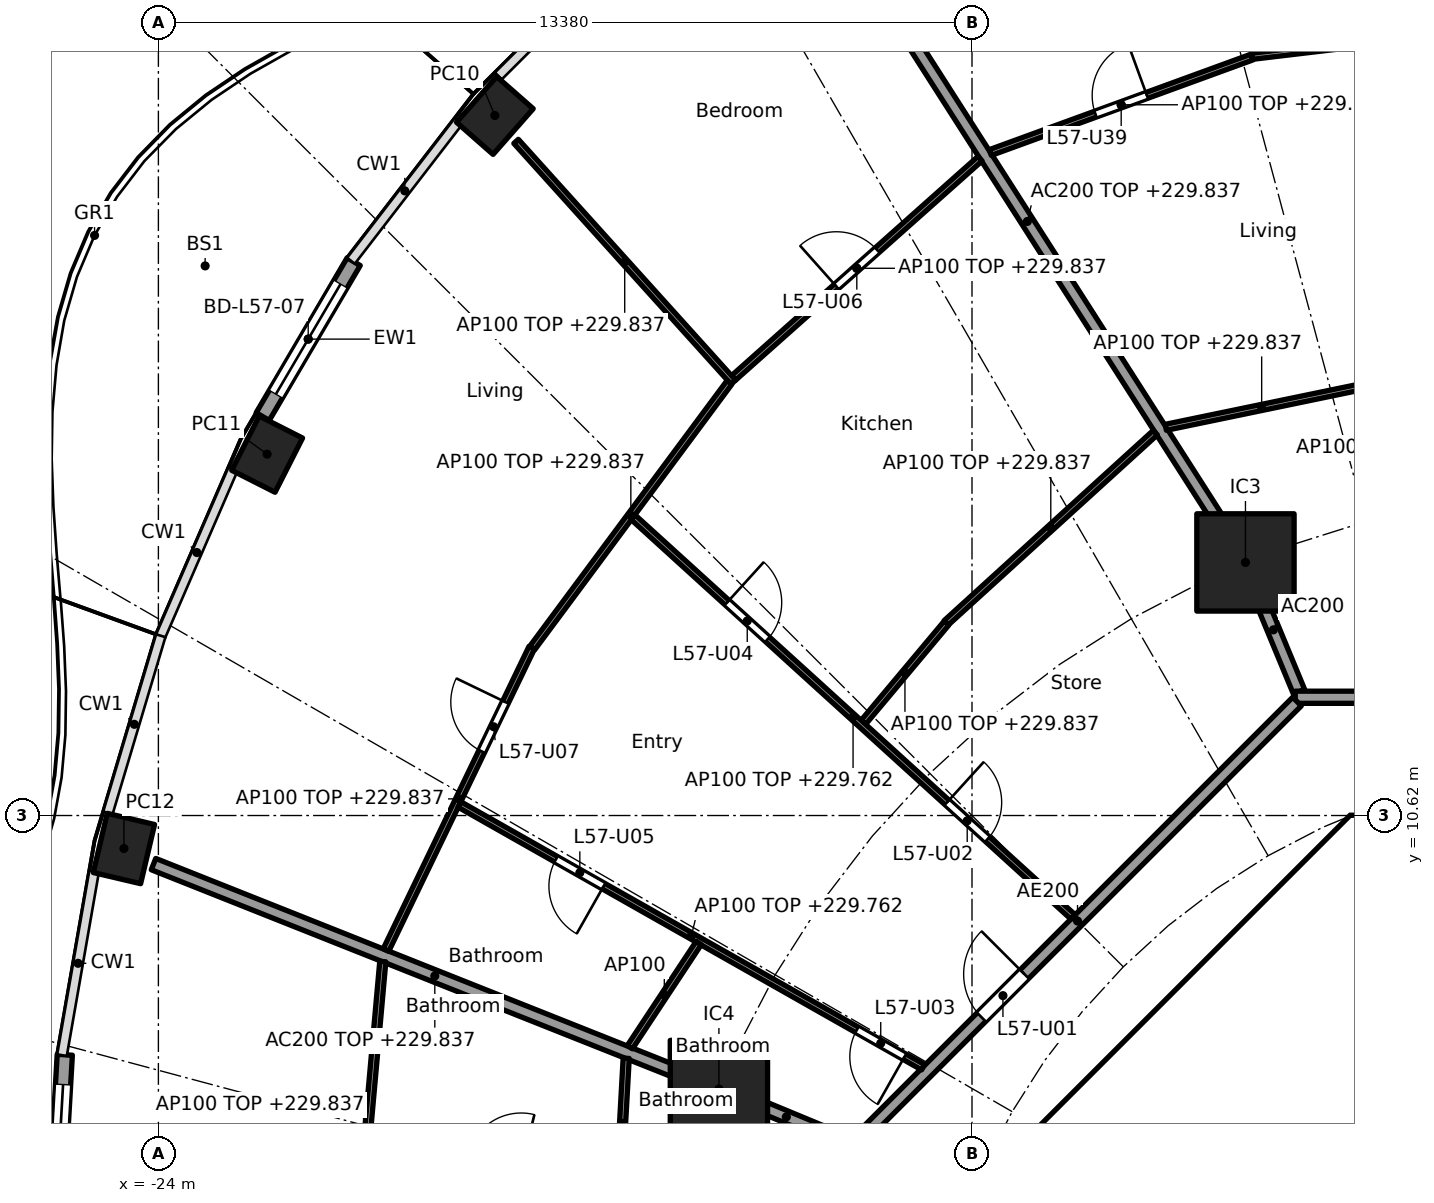
"""IFC4 building model, lengths in metres.
Left out: names, types, materials, properties, quantities, classifications, styles, units other than length and angle.
Written with IfcOpenShell. Run it as: python <this file> out.ifc"""

import sys

from ifc_helpers import new_model, si_unit, direction, frame, frame_2d, origin, origin_2d, place, context, subcontext, project, spatial, polyline, rectangle, hollow_rectangle, outline, extrude, element, fill, save


model = new_model("IFC4")
c1 = context("Model", 3, precision=1e-05, world=origin(), true_north=direction((0.0, 1.0)))
c2 = subcontext(c1, "Body", "Model", "MODEL_VIEW")
j1 = project(units=[si_unit("LENGTHUNIT", "METRE"), si_unit("PLANEANGLEUNIT", "RADIAN")], contexts=[c1])
p1 = place(None, origin())
s1 = spatial("IfcSite", under=j1, at=p1, CompositionType="ELEMENT")
p2 = place(p1, origin())
s2 = spatial("IfcBuilding", under=s1, at=p2, CompositionType="ELEMENT")
p3 = place(p2, frame((0.0, 0.0, 227.0)))
s3 = spatial("IfcBuildingStorey", under=s2, at=p3, CompositionType="ELEMENT", Elevation=227.0)
for number, where, z_axis, x_axis in (
    (1, (-18.467, 22.132, 0.0), (0.0, 0.0, 1.0), (-0.66, -0.751, 0.0)),
    (2, (-22.212, 16.563, 0.0), (0.0, 0.0, 1.0), (-0.452, -0.892, 0.0)),
    (3, (-24.567, 10.077, 0.0), (0.0, 0.0, 1.0), (-0.229, -0.973, 0.0)),
):
    element("IfcColumn", number, at=place(p3, frame(where, z_axis=z_axis, x_axis=x_axis)), inside=s3, PredefinedType="COLUMN", context=c2, shape_type="SweptSolid", body=[
        extrude(hollow_rectangle(XDim=1.0, YDim=0.8, WallThickness=0.032, at=origin_2d()), origin(), (0.0, 0.0, 1.0), 3.7),
    ])
for number, where, z_axis, x_axis in (
    (4, (-6.123, 14.782, 0.0), (0.0, 0.0, 1.0), (1.0, 0.0, 0.0)),
    (5, (-14.782, 6.123, 0.0), (0.0, 0.0, 1.0), (1.0, 0.0, 0.0)),
):
    element("IfcColumn", number, at=place(p3, frame(where, z_axis=z_axis, x_axis=x_axis)), inside=s3, PredefinedType="COLUMN", context=c2, shape_type="SweptSolid", body=[
        extrude(rectangle(XDim=1.6, YDim=1.6, at=origin_2d()), origin(), (0.0, 0.0, 1.0), 3.7),
    ])
p4 = place(p3, frame((-22.284, 17.181, 0.0), z_axis=(0.0, 0.0, 1.0), x_axis=(0.506330171469, 0.862339699573, 0.0)))
e6 = element("IfcWall", 6, at=p4, inside=s3, PredefinedType="SOLIDWALL", context=c2, shape_type="SweptSolid", body=[
    extrude(rectangle(XDim=2.954, YDim=0.25, at=frame_2d((1.477, 0.0))), origin(), (0.0, 0.0, 1.0), 3.44),
])
p5 = place(p4, frame((0.427, 0.0, 0.0)))
e7 = element("IfcOpeningElement", 7, at=p5, cuts=e6, PredefinedType="OPENING", context=c2, shape_type="SweptSolid", body=[
    extrude(rectangle(XDim=2.1, YDim=2.4, at=frame_2d((1.05, 1.2))), frame((0.0, 0.135, 0.0), z_axis=(0.0, -1.0, 0.0), x_axis=(1.0, 0.0, 0.0)), (0.0, 0.0, 1.0), 0.27),
])
p6 = place(p3, frame((-25.717, 3.61, 0.0), z_axis=(0.0, 0.0, 1.0), x_axis=(0.057528189427, 0.998343882348, 0.0)))
e8 = element("IfcWall", 8, at=p6, inside=s3, PredefinedType="SOLIDWALL", context=c2, shape_type="SweptSolid", body=[
    extrude(rectangle(XDim=3.081, YDim=0.25, at=frame_2d((1.541, 0.0))), origin(), (0.0, 0.0, 1.0), 3.44),
])
p7 = place(p6, frame((0.49, 0.0, 0.0)))
e9 = element("IfcOpeningElement", 9, at=p7, cuts=e8, PredefinedType="OPENING", context=c2, shape_type="SweptSolid", body=[
    extrude(rectangle(XDim=2.1, YDim=2.4, at=frame_2d((1.05, 1.2))), frame((0.0, 0.135, 0.0), z_axis=(0.0, -1.0, 0.0), x_axis=(1.0, 0.0, 0.0)), (0.0, 0.0, 1.0), 0.27),
])
p8 = place(p3, frame((-4.613, 9.988, 0.0), z_axis=(0.0, 0.0, 1.0), x_axis=(-0.707106781187, -0.707106781187, 0.0)))
e10 = element("IfcWall", 10, at=p8, inside=s3, PredefinedType="SHEAR", context=c2, shape_type="SweptSolid", body=[
    extrude(rectangle(XDim=7.602, YDim=0.6, at=frame_2d((3.801, 0.0))), origin(), (0.0, 0.0, 1.0), 3.44),
])
p9 = place(p8, frame((0.351, 0.0, 0.0)))
e11 = element("IfcOpeningElement", 11, at=p9, cuts=e10, PredefinedType="OPENING", context=c2, shape_type="SweptSolid", body=[
    extrude(rectangle(XDim=1.1, YDim=2.1, at=frame_2d((0.55, 1.05))), frame((0.0, 0.31, 0.0), z_axis=(0.0, -1.0, 0.0), x_axis=(1.0, 0.0, 0.0)), (0.0, 0.0, 1.0), 0.62),
])
p10 = place(p3, frame((-6.2, 4.3, 0.0), z_axis=(0.0, 0.0, 1.0), x_axis=(0.0, 1.0, 0.0)))
e12 = element("IfcWall", 12, at=p10, inside=s3, PredefinedType="PARTITIONING", context=c2, shape_type="SweptSolid", body=[
    extrude(rectangle(XDim=3.527, YDim=0.15, at=frame_2d((1.763, 0.0))), origin(), (0.0, 0.0, 1.0), 3.44),
])
p11 = place(p10, frame((0.262, 0.0, 0.0)))
e13 = element("IfcOpeningElement", 13, at=p11, cuts=e12, PredefinedType="OPENING", context=c2, shape_type="SweptSolid", body=[
    extrude(rectangle(XDim=0.9, YDim=2.1, at=frame_2d((0.45, 1.05))), frame((0.0, 0.085, 0.0), z_axis=(0.0, -1.0, 0.0), x_axis=(1.0, 0.0, 0.0)), (0.0, 0.0, 1.0), 0.17),
])
p12 = place(p10, frame((2.138, 0.0, 0.0)))
e14 = element("IfcOpeningElement", 14, at=p12, cuts=e12, PredefinedType="OPENING", context=c2, shape_type="SweptSolid", body=[
    extrude(rectangle(XDim=0.9, YDim=2.1, at=frame_2d((0.45, 1.05))), frame((0.0, 0.085, 0.0), z_axis=(0.0, -1.0, 0.0), x_axis=(1.0, 0.0, 0.0)), (0.0, 0.0, 1.0), 0.17),
])
p13 = place(p3, origin())
e15 = element("IfcWall", 15, at=p13, inside=s3, PredefinedType="SHEAR", context=c2, shape_type="SweptSolid", body=[
    extrude(outline(polyline([(-4.152, 10.025), (-4.401, 9.776), (-4.825, 10.2), (-4.401, 10.625), (4.401, 10.625), (4.825, 10.2), (4.401, 9.776), (4.152, 10.025), (-4.152, 10.025)])), origin(), (0.0, 0.0, 1.0), 3.44),
])
p14 = place(p3, frame((-8.301, 5.8, 0.0), z_axis=(0.0, 0.0, 1.0), x_axis=(1.0, 0.0, 0.0)))
e16 = element("IfcWall", 16, at=p14, inside=s3, PredefinedType="PARTITIONING", context=c2, shape_type="SweptSolid", body=[
    extrude(rectangle(XDim=2.026, YDim=0.15, at=frame_2d((1.013, 0.0))), origin(), (0.0, 0.0, 1.0), 3.44),
])
p15 = place(p3, frame((-5.243, 12.657, 0.0), z_axis=(0.0, 0.0, 1.0), x_axis=(-0.382691608661, 0.923876145736, 0.0)))
e17 = element("IfcWall", 17, at=p15, inside=s3, PredefinedType="PARTITIONING", context=c2, shape_type="SweptSolid", body=[
    extrude(rectangle(XDim=2.2, YDim=0.2, at=frame_2d((1.1, 0.0))), origin(), (0.0, 0.0, 1.0), 3.44),
])
p16 = place(p3, frame((-6.15, 14.824, 0.0), z_axis=(0.0, 0.0, 1.0), x_axis=(-0.538870687577, 0.842388498301, 0.0)))
e18 = element("IfcWall", 18, at=p16, inside=s3, PredefinedType="PARTITIONING", context=c2, shape_type="SweptSolid", body=[
    extrude(rectangle(XDim=13.213, YDim=0.2, at=frame_2d((6.606, 0.0))), origin(), (0.0, 0.0, 1.0), 2.837),
])
p17 = place(p3, frame((-12.657, 5.243, 0.0), z_axis=(0.0, 0.0, 1.0), x_axis=(-0.923859888513, 0.38273085373, 0.0)))
e19 = element("IfcWall", 19, at=p17, inside=s3, PredefinedType="PARTITIONING", context=c2, shape_type="SweptSolid", body=[
    extrude(rectangle(XDim=2.199, YDim=0.2, at=frame_2d((1.1, 0.0))), origin(), (0.0, 0.0, 1.0), 3.44),
])
p18 = place(p3, frame((-14.829, 6.141, 0.0), z_axis=(0.0, 0.0, 1.0), x_axis=(-0.929202069098, 0.36957206981, 0.0)))
e20 = element("IfcWall", 20, at=p18, inside=s3, PredefinedType="PARTITIONING", context=c2, shape_type="SweptSolid", body=[
    extrude(rectangle(XDim=9.957, YDim=0.2, at=frame_2d((4.978, 0.0))), origin(), (0.0, 0.0, 1.0), 2.837),
])
p19 = place(p3, frame((5.104, 12.565, 0.0), z_axis=(0.0, 0.0, 1.0), x_axis=(-1.0, 0.0, 0.0)))
e21 = element("IfcWall", 21, at=p19, inside=s3, PredefinedType="PARTITIONING", context=c2, shape_type="SweptSolid", body=[
    extrude(rectangle(XDim=10.409, YDim=0.2, at=frame_2d((5.205, 0.0))), origin(), (0.0, 0.0, 1.0), 3.44),
])
p20 = place(p19, frame((3.303, 0.0, 0.0)))
e22 = element("IfcOpeningElement", 22, at=p20, cuts=e21, PredefinedType="OPENING", context=c2, shape_type="SweptSolid", body=[
    extrude(rectangle(XDim=1.0, YDim=2.1, at=frame_2d((0.5, 1.05))), frame((0.0, 0.11, 0.0), z_axis=(0.0, -1.0, 0.0), x_axis=(1.0, 0.0, 0.0)), (0.0, 0.0, 1.0), 0.22),
])
p21 = place(p3, frame((-5.275, 12.494, 0.0), z_axis=(0.0, 0.0, 1.0), x_axis=(-0.707106781187, -0.707106781187, 0.0)))
e23 = element("IfcWall", 23, at=p21, inside=s3, PredefinedType="PARTITIONING", context=c2, shape_type="SweptSolid", body=[
    extrude(rectangle(XDim=10.209, YDim=0.2, at=frame_2d((5.104, 0.0))), origin(), (0.0, 0.0, 1.0), 3.44),
])
p22 = place(p21, frame((6.339, 0.0, 0.0)))
e24 = element("IfcOpeningElement", 24, at=p22, cuts=e23, PredefinedType="OPENING", context=c2, shape_type="SweptSolid", body=[
    extrude(rectangle(XDim=1.0, YDim=2.1, at=frame_2d((0.5, 1.05))), frame((0.0, 0.11, 0.0), z_axis=(0.0, -1.0, 0.0), x_axis=(1.0, 0.0, 0.0)), (0.0, 0.0, 1.0), 0.22),
])
p23 = place(p3, frame((-1.166, 23.683, 0.0), z_axis=(0.0, 0.0, 1.0), x_axis=(-0.992961712415, -0.118435795593, 0.0)))
e25 = element("IfcWall", 25, at=p23, inside=s3, PredefinedType="PARTITIONING", context=c2, shape_type="SweptSolid", body=[
    extrude(rectangle(XDim=4.885, YDim=0.1, at=frame_2d((2.443, 0.0))), origin(), (0.0, 0.0, 1.0), 2.837),
])
p24 = place(p3, frame((-4.28, 17.657, 0.0), z_axis=(0.0, 0.0, 1.0), x_axis=(-0.979195545385, -0.202918909661, 0.0)))
e26 = element("IfcWall", 26, at=p24, inside=s3, PredefinedType="PARTITIONING", context=c2, shape_type="SweptSolid", body=[
    extrude(rectangle(XDim=3.221, YDim=0.1, at=frame_2d((1.61, 0.0))), origin(), (0.0, 0.0, 1.0), 2.837),
])
p25 = place(p3, frame((-6.014, 23.094, 0.0), z_axis=(0.0, 0.0, 1.0), x_axis=(-0.939433575811, -0.342731026665, 0.0)))
e27 = element("IfcWall", 27, at=p25, inside=s3, PredefinedType="PARTITIONING", context=c2, shape_type="SweptSolid", body=[
    extrude(rectangle(XDim=4.583, YDim=0.1, at=frame_2d((2.291, 0.0))), origin(), (0.0, 0.0, 1.0), 2.837),
])
p26 = place(p25, frame((1.841, 0.0, 0.0)))
e28 = element("IfcOpeningElement", 28, at=p26, cuts=e27, PredefinedType="OPENING", context=c2, shape_type="SweptSolid", body=[
    extrude(rectangle(XDim=0.9, YDim=2.1, at=frame_2d((0.45, 1.05))), frame((0.0, 0.06, 0.0), z_axis=(0.0, -1.0, 0.0), x_axis=(1.0, 0.0, 0.0)), (0.0, 0.0, 1.0), 0.12),
])
p27 = place(p3, frame((-7.605, 16.917, 0.0), z_axis=(0.0, 0.0, 1.0), x_axis=(-0.739828340504, -0.672795679673, 0.0)))
e29 = element("IfcWall", 29, at=p27, inside=s3, PredefinedType="PARTITIONING", context=c2, shape_type="SweptSolid", body=[
    extrude(rectangle(XDim=4.647, YDim=0.1, at=frame_2d((2.324, 0.0))), origin(), (0.0, 0.0, 1.0), 2.837),
])
p28 = place(p3, frame((-10.488, 21.422, 0.0), z_axis=(0.0, 0.0, 1.0), x_axis=(-0.747148551049, -0.664657086523, 0.0)))
e30 = element("IfcWall", 30, at=p28, inside=s3, PredefinedType="PARTITIONING", context=c2, shape_type="SweptSolid", body=[
    extrude(rectangle(XDim=5.425, YDim=0.1, at=frame_2d((2.712, 0.0))), origin(), (0.0, 0.0, 1.0), 2.837),
])
p29 = place(p28, frame((2.262, 0.0, 0.0)))
e31 = element("IfcOpeningElement", 31, at=p29, cuts=e30, PredefinedType="OPENING", context=c2, shape_type="SweptSolid", body=[
    extrude(rectangle(XDim=0.9, YDim=2.1, at=frame_2d((0.45, 1.05))), frame((0.0, 0.06, 0.0), z_axis=(0.0, -1.0, 0.0), x_axis=(1.0, 0.0, 0.0)), (0.0, 0.0, 1.0), 0.12),
])
p30 = place(p3, frame((-11.039, 13.785, 0.0), z_axis=(0.0, 0.0, 1.0), x_axis=(-0.642323585424, -0.766433566337, 0.0)))
e32 = element("IfcWall", 32, at=p30, inside=s3, PredefinedType="PARTITIONING", context=c2, shape_type="SweptSolid", body=[
    extrude(rectangle(XDim=2.13, YDim=0.1, at=frame_2d((1.065, 0.0))), origin(), (0.0, 0.0, 1.0), 2.837),
])
p31 = place(p3, frame((-14.545, 17.746, 0.0), z_axis=(0.0, 0.0, 1.0), x_axis=(-0.669829144173, 0.742515264232, 0.0)))
e33 = element("IfcWall", 33, at=p31, inside=s3, PredefinedType="PARTITIONING", context=c2, shape_type="SweptSolid", body=[
    extrude(rectangle(XDim=5.334, YDim=0.1, at=frame_2d((2.667, 0.0))), origin(), (0.0, 0.0, 1.0), 2.837),
])
p32 = place(p3, frame((-14.608, 17.743, 0.0), z_axis=(0.0, 0.0, 1.0), x_axis=(-0.596174489482, -0.8028548923, 0.0)))
e34 = element("IfcWall", 34, at=p32, inside=s3, PredefinedType="PARTITIONING", context=c2, shape_type="SweptSolid", body=[
    extrude(rectangle(XDim=5.442, YDim=0.1, at=frame_2d((2.721, 0.0))), origin(), (0.0, 0.0, 1.0), 2.837),
])
p33 = place(p3, frame((-8.959, 8.952, 0.0), z_axis=(0.0, 0.0, 1.0), x_axis=(-0.740140081805, 0.672452719011, 0.0)))
e35 = element("IfcWall", 35, at=p33, inside=s3, PredefinedType="PARTITIONING", context=c2, shape_type="SweptSolid", body=[
    extrude(rectangle(XDim=9.775, YDim=0.1, at=frame_2d((4.887, 0.0))), origin(), (0.0, 0.0, 1.0), 2.762),
])
p34 = place(p33, frame((1.901, 0.0, 0.0)))
e36 = element("IfcOpeningElement", 36, at=p34, cuts=e35, PredefinedType="OPENING", context=c2, shape_type="SweptSolid", body=[
    extrude(rectangle(XDim=0.9, YDim=2.1, at=frame_2d((0.45, 1.05))), frame((0.0, 0.06, 0.0), z_axis=(0.0, -1.0, 0.0), x_axis=(1.0, 0.0, 0.0)), (0.0, 0.0, 1.0), 0.12),
])
p35 = place(p33, frame((6.789, 0.0, 0.0)))
e37 = element("IfcOpeningElement", 37, at=p35, cuts=e35, PredefinedType="OPENING", context=c2, shape_type="SweptSolid", body=[
    extrude(rectangle(XDim=0.9, YDim=2.1, at=frame_2d((0.45, 1.05))), frame((0.0, 0.06, 0.0), z_axis=(0.0, -1.0, 0.0), x_axis=(1.0, 0.0, 0.0)), (0.0, 0.0, 1.0), 0.12),
])
p36 = place(p3, frame((-17.861, 13.379, 0.0), z_axis=(0.0, 0.0, 1.0), x_axis=(-0.434302390612, -0.900767136117, 0.0)))
e38 = element("IfcWall", 38, at=p36, inside=s3, PredefinedType="PARTITIONING", context=c2, shape_type="SweptSolid", body=[
    extrude(rectangle(XDim=5.519, YDim=0.1, at=frame_2d((2.759, 0.0))), origin(), (0.0, 0.0, 1.0), 2.837),
])
p37 = place(p36, frame((0.992, 0.0, 0.0)))
e39 = element("IfcOpeningElement", 39, at=p37, cuts=e38, PredefinedType="OPENING", context=c2, shape_type="SweptSolid", body=[
    extrude(rectangle(XDim=0.9, YDim=2.1, at=frame_2d((0.45, 1.05))), frame((0.0, 0.06, 0.0), z_axis=(0.0, -1.0, 0.0), x_axis=(1.0, 0.0, 0.0)), (0.0, 0.0, 1.0), 0.12),
])
p38 = place(p3, frame((-11.425, 6.48, 0.0), z_axis=(0.0, 0.0, 1.0), x_axis=(-0.869969596547, 0.493105365094, 0.0)))
e40 = element("IfcWall", 40, at=p38, inside=s3, PredefinedType="PARTITIONING", context=c2, shape_type="SweptSolid", body=[
    extrude(rectangle(XDim=8.762, YDim=0.1, at=frame_2d((4.381, 0.0))), origin(), (0.0, 0.0, 1.0), 2.762),
])
p39 = place(p38, frame((0.35, 0.0, 0.0)))
e41 = element("IfcOpeningElement", 41, at=p39, cuts=e40, PredefinedType="OPENING", context=c2, shape_type="SweptSolid", body=[
    extrude(rectangle(XDim=0.9, YDim=2.1, at=frame_2d((0.45, 1.05))), frame((0.0, 0.06, 0.0), z_axis=(0.0, -1.0, 0.0), x_axis=(1.0, 0.0, 0.0)), (0.0, 0.0, 1.0), 0.12),
])
p40 = place(p38, frame((6.038, 0.0, 0.0)))
e42 = element("IfcOpeningElement", 42, at=p40, cuts=e40, PredefinedType="OPENING", context=c2, shape_type="SweptSolid", body=[
    extrude(rectangle(XDim=0.9, YDim=2.1, at=frame_2d((0.45, 1.05))), frame((0.0, 0.06, 0.0), z_axis=(0.0, -1.0, 0.0), x_axis=(1.0, 0.0, 0.0)), (0.0, 0.0, 1.0), 0.12),
])
p41 = place(p3, frame((-15.114, 8.524, 0.0), z_axis=(0.0, 0.0, 1.0), x_axis=(-0.551211457161, -0.834365585037, 0.0)))
e43 = element("IfcWall", 43, at=p41, inside=s3, PredefinedType="PARTITIONING", context=c2, shape_type="SweptSolid", body=[
    extrude(rectangle(XDim=2.054, YDim=0.1, at=frame_2d((1.027, 0.0))), origin(), (0.0, 0.0, 1.0), 3.44),
])
p42 = place(p3, frame((-16.307, 6.627, 0.0), z_axis=(0.0, 0.0, 1.0), x_axis=(-0.055608865939, -0.998452629837, 0.0)))
e44 = element("IfcWall", 44, at=p42, inside=s3, PredefinedType="PARTITIONING", context=c2, shape_type="SweptSolid", body=[
    extrude(rectangle(XDim=2.143, YDim=0.1, at=frame_2d((1.071, 0.0))), origin(), (0.0, 0.0, 1.0), 2.837),
])
p43 = place(p3, frame((-20.31, 8.218, 0.0), z_axis=(0.0, 0.0, 1.0), x_axis=(-0.089284106956, -0.996006198899, 0.0)))
e45 = element("IfcWall", 45, at=p43, inside=s3, PredefinedType="PARTITIONING", context=c2, shape_type="SweptSolid", body=[
    extrude(rectangle(XDim=5.698, YDim=0.1, at=frame_2d((2.849, 0.0))), origin(), (0.0, 0.0, 1.0), 2.837),
])
p44 = place(p43, frame((3.761, 0.0, 0.0)))
e46 = element("IfcOpeningElement", 46, at=p44, cuts=e45, PredefinedType="OPENING", context=c2, shape_type="SweptSolid", body=[
    extrude(rectangle(XDim=0.9, YDim=2.1, at=frame_2d((0.45, 1.05))), frame((0.0, 0.06, 0.0), z_axis=(0.0, -1.0, 0.0), x_axis=(1.0, 0.0, 0.0)), (0.0, 0.0, 1.0), 0.12),
])
p45 = place(p5, origin())
e47 = element("IfcDoor", 47, at=p45, inside=s3, OperationType="SLIDING_TO_LEFT", PredefinedType="DOOR", context=c2, shape_type="SweptSolid", body=[
    extrude(rectangle(XDim=2.1, YDim=2.4, at=frame_2d((1.05, 1.2))), frame((0.0, 0.025, 0.0), z_axis=(0.0, -1.0, 0.0), x_axis=(1.0, 0.0, 0.0)), (0.0, 0.0, 1.0), 0.05),
])
fill(e7, e47)
p46 = place(p7, origin())
e48 = element("IfcDoor", 48, at=p46, inside=s3, OperationType="SLIDING_TO_LEFT", PredefinedType="DOOR", context=c2, shape_type="SweptSolid", body=[
    extrude(rectangle(XDim=2.1, YDim=2.4, at=frame_2d((1.05, 1.2))), frame((0.0, 0.025, 0.0), z_axis=(0.0, -1.0, 0.0), x_axis=(1.0, 0.0, 0.0)), (0.0, 0.0, 1.0), 0.05),
])
fill(e9, e48)
p47 = place(p12, origin())
e49 = element("IfcDoor", 49, at=p47, inside=s3, OperationType="SINGLE_SWING_LEFT", PredefinedType="DOOR", context=c2, shape_type="SweptSolid", body=[
    extrude(rectangle(XDim=0.9, YDim=2.1, at=frame_2d((0.45, 1.05))), frame((0.0, 0.025, 0.0), z_axis=(0.0, -1.0, 0.0), x_axis=(1.0, 0.0, 0.0)), (0.0, 0.0, 1.0), 0.05),
])
fill(e14, e49)
p48 = place(p9, origin())
e50 = element("IfcDoor", 50, at=p48, inside=s3, OperationType="SINGLE_SWING_LEFT", PredefinedType="DOOR", context=c2, shape_type="SweptSolid", body=[
    extrude(rectangle(XDim=1.1, YDim=2.1, at=frame_2d((0.55, 1.05))), frame((0.0, 0.025, 0.0), z_axis=(0.0, -1.0, 0.0), x_axis=(1.0, 0.0, 0.0)), (0.0, 0.0, 1.0), 0.05),
])
fill(e11, e50)
p49 = place(p22, frame((1.0, 0.0, 0.0), x_axis=(-1.0, 0.0, 0.0)))
e51 = element("IfcDoor", 51, at=p49, inside=s3, OperationType="SINGLE_SWING_RIGHT", PredefinedType="DOOR", context=c2, shape_type="SweptSolid", body=[
    extrude(rectangle(XDim=1.0, YDim=2.1, at=frame_2d((0.5, 1.05))), frame((0.0, 0.025, 0.0), z_axis=(0.0, -1.0, 0.0), x_axis=(1.0, 0.0, 0.0)), (0.0, 0.0, 1.0), 0.05),
])
fill(e24, e51)
p50 = place(p34, frame((0.9, 0.0, 0.0), x_axis=(-1.0, 0.0, 0.0)))
e52 = element("IfcDoor", 52, at=p50, inside=s3, OperationType="SINGLE_SWING_LEFT", PredefinedType="DOOR", context=c2, shape_type="SweptSolid", body=[
    extrude(rectangle(XDim=0.9, YDim=2.1, at=frame_2d((0.45, 1.05))), frame((0.0, 0.025, 0.0), z_axis=(0.0, -1.0, 0.0), x_axis=(1.0, 0.0, 0.0)), (0.0, 0.0, 1.0), 0.05),
])
fill(e36, e52)
p51 = place(p39, origin())
e53 = element("IfcDoor", 53, at=p51, inside=s3, OperationType="SINGLE_SWING_LEFT", PredefinedType="DOOR", context=c2, shape_type="SweptSolid", body=[
    extrude(rectangle(XDim=0.9, YDim=2.1, at=frame_2d((0.45, 1.05))), frame((0.0, 0.025, 0.0), z_axis=(0.0, -1.0, 0.0), x_axis=(1.0, 0.0, 0.0)), (0.0, 0.0, 1.0), 0.05),
])
fill(e41, e53)
p52 = place(p35, frame((0.9, 0.0, 0.0), x_axis=(-1.0, 0.0, 0.0)))
e54 = element("IfcDoor", 54, at=p52, inside=s3, OperationType="SINGLE_SWING_LEFT", PredefinedType="DOOR", context=c2, shape_type="SweptSolid", body=[
    extrude(rectangle(XDim=0.9, YDim=2.1, at=frame_2d((0.45, 1.05))), frame((0.0, 0.025, 0.0), z_axis=(0.0, -1.0, 0.0), x_axis=(1.0, 0.0, 0.0)), (0.0, 0.0, 1.0), 0.05),
])
fill(e37, e54)
p53 = place(p40, origin())
e55 = element("IfcDoor", 55, at=p53, inside=s3, OperationType="SINGLE_SWING_LEFT", PredefinedType="DOOR", context=c2, shape_type="SweptSolid", body=[
    extrude(rectangle(XDim=0.9, YDim=2.1, at=frame_2d((0.45, 1.05))), frame((0.0, 0.025, 0.0), z_axis=(0.0, -1.0, 0.0), x_axis=(1.0, 0.0, 0.0)), (0.0, 0.0, 1.0), 0.05),
])
fill(e42, e55)
p54 = place(p29, frame((0.9, 0.0, 0.0), x_axis=(-1.0, 0.0, 0.0)))
e56 = element("IfcDoor", 56, at=p54, inside=s3, OperationType="SINGLE_SWING_LEFT", PredefinedType="DOOR", context=c2, shape_type="SweptSolid", body=[
    extrude(rectangle(XDim=0.9, YDim=2.1, at=frame_2d((0.45, 1.05))), frame((0.0, 0.025, 0.0), z_axis=(0.0, -1.0, 0.0), x_axis=(1.0, 0.0, 0.0)), (0.0, 0.0, 1.0), 0.05),
])
fill(e31, e56)
p55 = place(p37, frame((0.9, 0.0, 0.0), x_axis=(-1.0, 0.0, 0.0)))
e57 = element("IfcDoor", 57, at=p55, inside=s3, OperationType="SINGLE_SWING_RIGHT", PredefinedType="DOOR", context=c2, shape_type="SweptSolid", body=[
    extrude(rectangle(XDim=0.9, YDim=2.1, at=frame_2d((0.45, 1.05))), frame((0.0, 0.025, 0.0), z_axis=(0.0, -1.0, 0.0), x_axis=(1.0, 0.0, 0.0)), (0.0, 0.0, 1.0), 0.05),
])
fill(e39, e57)
p56 = place(p26, frame((0.9, 0.0, 0.0), x_axis=(-1.0, 0.0, 0.0)))
e58 = element("IfcDoor", 58, at=p56, inside=s3, OperationType="SINGLE_SWING_RIGHT", PredefinedType="DOOR", context=c2, shape_type="SweptSolid", body=[
    extrude(rectangle(XDim=0.9, YDim=2.1, at=frame_2d((0.45, 1.05))), frame((0.0, 0.025, 0.0), z_axis=(0.0, -1.0, 0.0), x_axis=(1.0, 0.0, 0.0)), (0.0, 0.0, 1.0), 0.05),
])
fill(e28, e58)
save(model, sys.argv[1])
